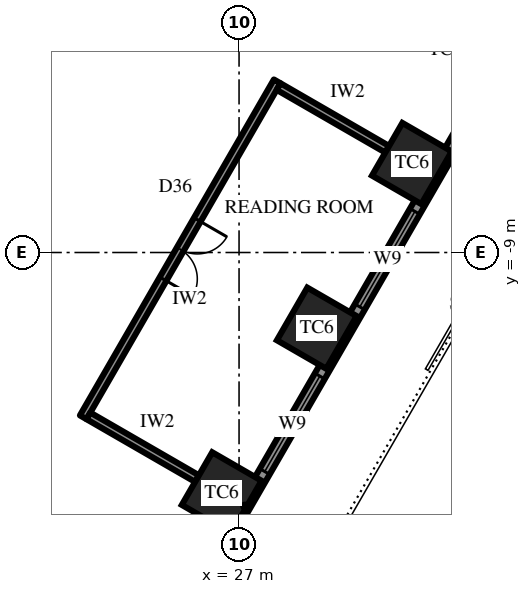
"""IFC4 building model, lengths in metres.
Left out: names, types, materials, properties, quantities, classifications, styles, units other than length and angle.
Written with IfcOpenShell. Run it as: python <this file> out.ifc"""

import sys

from ifc_helpers import new_model, si_unit, direction, frame, frame_2d, origin, origin_2d, place, context, subcontext, project, spatial, rectangle, extrude, element, fill, save


model = new_model("IFC4")
c1 = context("Model", 3, precision=1e-05, world=origin(), true_north=direction((0.0, 1.0)))
c2 = subcontext(c1, "Body", "Model", "MODEL_VIEW")
j1 = project(units=[si_unit("LENGTHUNIT", "METRE"), si_unit("PLANEANGLEUNIT", "RADIAN")], contexts=[c1])
p1 = place(None, origin())
s1 = spatial("IfcSite", under=j1, at=p1, CompositionType="ELEMENT")
p2 = place(p1, origin())
s2 = spatial("IfcBuilding", under=s1, at=p2, CompositionType="ELEMENT")
p3 = place(p2, frame((0.0, 0.0, 148.9)))
s3 = spatial("IfcBuildingStorey", under=s2, at=p3, CompositionType="ELEMENT", Elevation=148.9)
for number, where, z_axis, x_axis in (
    (1, (26.544, -15.325, 0.0), (0.0, 0.0, 1.0), (0.5, 0.866, 0.0)),
    (2, (29.045, -10.992, 0.0), (0.0, 0.0, 1.0), (0.5, 0.866, 0.0)),
    (3, (31.547, -6.658, 0.0), (0.0, 0.0, 1.0), (0.5, 0.866, 0.0)),
):
    element("IfcColumn", number, at=place(p3, frame(where, z_axis=z_axis, x_axis=x_axis)), inside=s3, PredefinedType="COLUMN", context=c2, shape_type="SweptSolid", body=[
        extrude(rectangle(XDim=1.6, YDim=1.5, at=origin_2d()), origin(), (0.0, 0.0, 1.0), 4.2),
    ])
p4 = place(p3, frame((19.644, -28.675, 0.0), z_axis=(0.0, 0.0, 1.0), x_axis=(0.500003084452, 0.866023622968, 0.0)))
e4 = element("IfcWall", 4, at=p4, inside=s3, PredefinedType="SOLIDWALL", context=c2, shape_type="SweptSolid", body=[
    extrude(rectangle(XDim=30.022, YDim=0.3, at=frame_2d((15.011, 0.0))), origin(), (0.0, 0.0, 1.0), 2.75),
])
p5 = place(p4, frame((1.052, 0.0, 0.6)))
e5 = element("IfcOpeningElement", 5, at=p5, cuts=e4, PredefinedType="OPENING", context=c2, shape_type="SweptSolid", body=[
    extrude(rectangle(XDim=2.9, YDim=1.9, at=frame_2d((1.45, 0.95))), frame((0.0, 0.16, 0.0), z_axis=(0.0, -1.0, 0.0), x_axis=(1.0, 0.0, 0.0)), (0.0, 0.0, 1.0), 0.32),
])
p6 = place(p4, frame((6.056, 0.0, 0.6)))
e6 = element("IfcOpeningElement", 6, at=p6, cuts=e4, PredefinedType="OPENING", context=c2, shape_type="SweptSolid", body=[
    extrude(rectangle(XDim=2.9, YDim=1.9, at=frame_2d((1.45, 0.95))), frame((0.0, 0.16, 0.0), z_axis=(0.0, -1.0, 0.0), x_axis=(1.0, 0.0, 0.0)), (0.0, 0.0, 1.0), 0.32),
])
p7 = place(p4, frame((11.909, 0.0, 0.0)))
e7 = element("IfcOpeningElement", 7, at=p7, cuts=e4, PredefinedType="OPENING", context=c2, shape_type="SweptSolid", body=[
    extrude(rectangle(XDim=1.2, YDim=2.4, at=frame_2d((0.6, 1.2))), frame((0.0, 0.16, 0.0), z_axis=(0.0, -1.0, 0.0), x_axis=(1.0, 0.0, 0.0)), (0.0, 0.0, 1.0), 0.32),
])
p8 = place(p4, frame((16.063, 0.0, 0.6)))
e8 = element("IfcOpeningElement", 8, at=p8, cuts=e4, PredefinedType="OPENING", context=c2, shape_type="SweptSolid", body=[
    extrude(rectangle(XDim=2.9, YDim=1.9, at=frame_2d((1.45, 0.95))), frame((0.0, 0.16, 0.0), z_axis=(0.0, -1.0, 0.0), x_axis=(1.0, 0.0, 0.0)), (0.0, 0.0, 1.0), 0.32),
])
p9 = place(p4, frame((21.067, 0.0, 0.6)))
e9 = element("IfcOpeningElement", 9, at=p9, cuts=e4, PredefinedType="OPENING", context=c2, shape_type="SweptSolid", body=[
    extrude(rectangle(XDim=2.9, YDim=1.9, at=frame_2d((1.45, 0.95))), frame((0.0, 0.16, 0.0), z_axis=(0.0, -1.0, 0.0), x_axis=(1.0, 0.0, 0.0)), (0.0, 0.0, 1.0), 0.32),
])
p10 = place(p4, frame((26.07, 0.0, 0.6)))
e10 = element("IfcOpeningElement", 10, at=p10, cuts=e4, PredefinedType="OPENING", context=c2, shape_type="SweptSolid", body=[
    extrude(rectangle(XDim=2.9, YDim=1.9, at=frame_2d((1.45, 0.95))), frame((0.0, 0.16, 0.0), z_axis=(0.0, -1.0, 0.0), x_axis=(1.0, 0.0, 0.0)), (0.0, 0.0, 1.0), 0.32),
])
p11 = place(p3, frame((22.9, -13.337, 0.0), z_axis=(0.0, 0.0, 1.0), x_axis=(0.500005407604, 0.86602228168, 0.0)))
e11 = element("IfcWall", 11, at=p11, inside=s3, PredefinedType="PARTITIONING", context=c2, shape_type="SweptSolid", body=[
    extrude(rectangle(XDim=10.208, YDim=0.2, at=frame_2d((5.104, 0.0))), origin(), (0.0, 0.0, 1.0), 4.0),
])
p12 = place(p11, frame((4.204, 0.0, 0.0)))
e12 = element("IfcOpeningElement", 12, at=p12, cuts=e11, PredefinedType="OPENING", context=c2, shape_type="SweptSolid", body=[
    extrude(rectangle(XDim=1.8, YDim=2.4, at=frame_2d((0.9, 1.2))), frame((0.0, 0.11, 0.0), z_axis=(0.0, -1.0, 0.0), x_axis=(1.0, 0.0, 0.0)), (0.0, 0.0, 1.0), 0.22),
])
p13 = place(p3, frame((23.036, -13.3, 0.0), z_axis=(0.0, 0.0, 1.0), x_axis=(0.866021716278, -0.500006386895, 0.0)))
e13 = element("IfcWall", 13, at=p13, inside=s3, PredefinedType="PARTITIONING", context=c2, shape_type="SweptSolid", body=[
    extrude(rectangle(XDim=3.3, YDim=0.2, at=frame_2d((1.65, 0.0))), origin(), (0.0, 0.0, 1.0), 4.0),
])
p14 = place(p3, frame((28.04, -4.633, 0.0), z_axis=(0.0, 0.0, 1.0), x_axis=(0.866008176907, -0.50002983664, 0.0)))
e14 = element("IfcWall", 14, at=p14, inside=s3, PredefinedType="PARTITIONING", context=c2, shape_type="SweptSolid", body=[
    extrude(rectangle(XDim=3.3, YDim=0.2, at=frame_2d((1.65, 0.0))), origin(), (0.0, 0.0, 1.0), 3.082),
])
p15 = place(p8, origin())
e15 = element("IfcWindow", 15, at=p15, inside=s3, PartitioningType="SINGLE_PANEL", PredefinedType="WINDOW", context=c2, shape_type="SweptSolid", body=[
    extrude(rectangle(XDim=2.9, YDim=1.9, at=frame_2d((1.45, 0.95))), frame((0.0, 0.03, 0.0), z_axis=(0.0, -1.0, 0.0), x_axis=(1.0, 0.0, 0.0)), (0.0, 0.0, 1.0), 0.06),
])
fill(e8, e15)
p16 = place(p9, origin())
e16 = element("IfcWindow", 16, at=p16, inside=s3, PartitioningType="SINGLE_PANEL", PredefinedType="WINDOW", context=c2, shape_type="SweptSolid", body=[
    extrude(rectangle(XDim=2.9, YDim=1.9, at=frame_2d((1.45, 0.95))), frame((0.0, 0.03, 0.0), z_axis=(0.0, -1.0, 0.0), x_axis=(1.0, 0.0, 0.0)), (0.0, 0.0, 1.0), 0.06),
])
fill(e9, e16)
p17 = place(p12, frame((1.8, 0.0, 0.0), z_axis=(0.0, 0.0, 1.0), x_axis=(-1.0, 0.0, 0.0)))
e17 = element("IfcDoor", 17, at=p17, inside=s3, OperationType="DOUBLE_DOOR_SINGLE_SWING", PredefinedType="DOOR", context=c2, shape_type="SweptSolid", body=[
    extrude(rectangle(XDim=1.8, YDim=2.4, at=frame_2d((0.9, 1.2))), frame((0.0, 0.025, 0.0), z_axis=(0.0, -1.0, 0.0), x_axis=(1.0, 0.0, 0.0)), (0.0, 0.0, 1.0), 0.05),
])
fill(e12, e17)
save(model, sys.argv[1])
